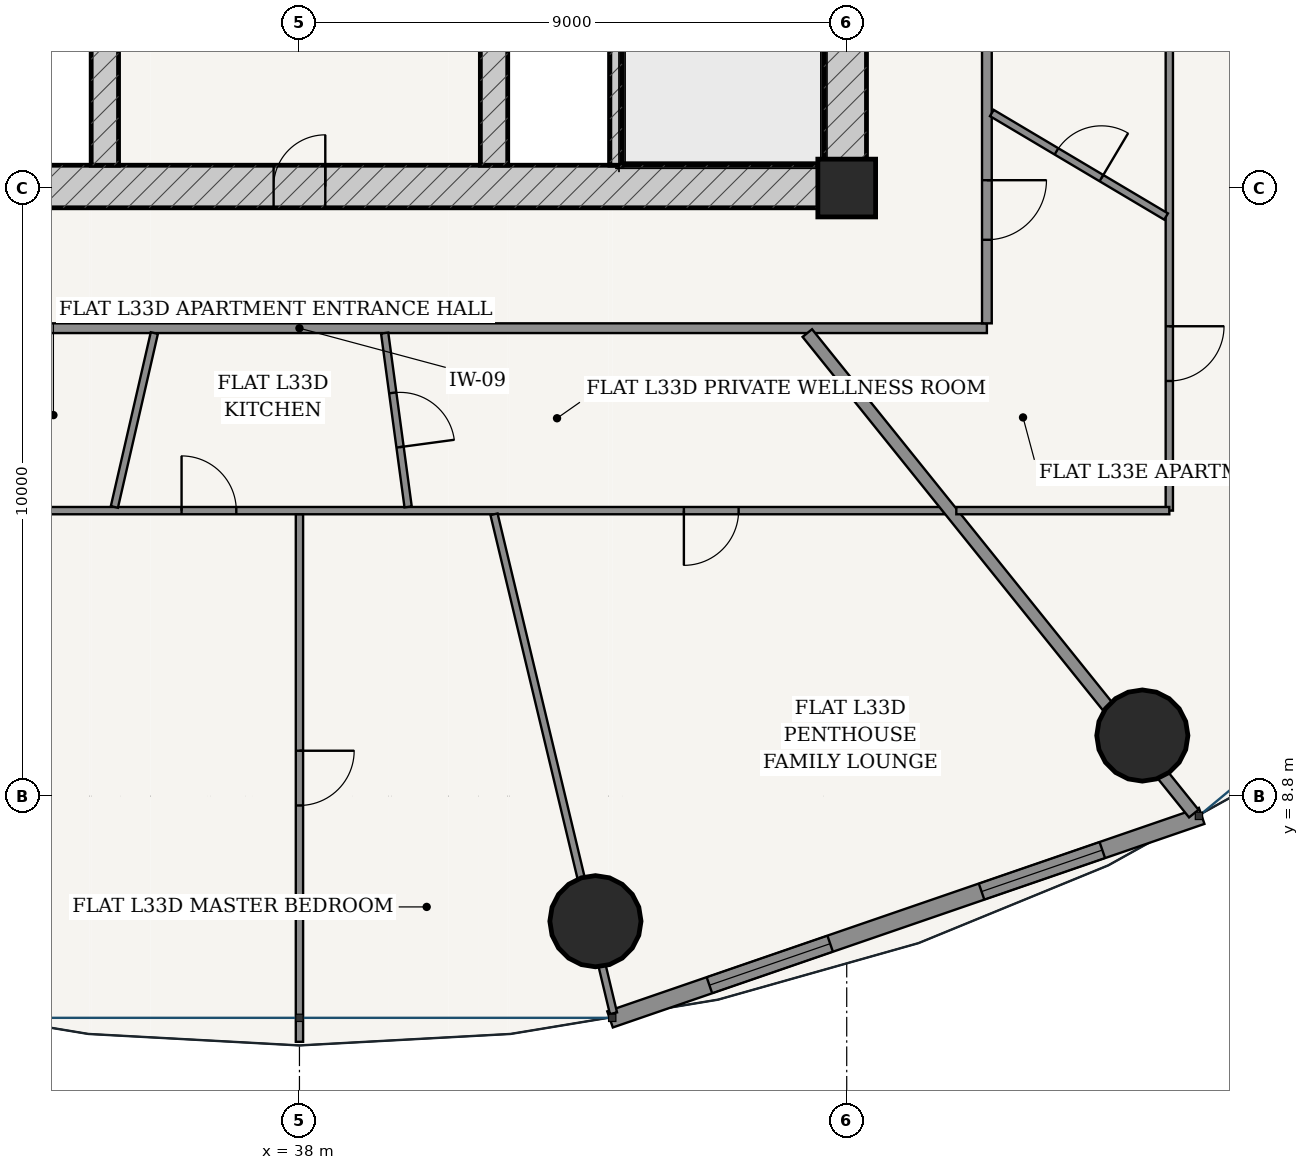
"""IFC4 building model, lengths in metres.
Left out: names, types, materials, properties, quantities, classifications, styles, units other than length and angle.
Written with IfcOpenShell. Run it as: python <this file> out.ifc"""

import sys

from ifc_helpers import new_model, si_unit, direction, frame, frame_2d, origin, origin_2d, place, context, subcontext, project, spatial, rectangle, hollow_circle, extrude, source, transform, mapped, element, fill, save


model = new_model("IFC4")
c1 = context("Model", 3, precision=1e-05, world=origin(), true_north=direction((-0.2419218956, 0.970295726276)))
c2 = subcontext(c1, "Body", "Model", "MODEL_VIEW")
j1 = project(units=[si_unit("LENGTHUNIT", "METRE"), si_unit("PLANEANGLEUNIT", "RADIAN")], contexts=[c1])
p1 = place(None, origin())
s1 = spatial("IfcSite", under=j1, at=p1, CompositionType="ELEMENT")
p2 = place(p1, origin())
s2 = spatial("IfcBuilding", under=s1, at=p2, CompositionType="ELEMENT")
p3 = place(p2, frame((0.0, 0.0, 126.6)))
s3 = spatial("IfcBuildingStorey", under=s2, at=p3, CompositionType="ELEMENT", Elevation=126.6)
p4 = place(p3, frame((47.0, 18.8, 0.0), z_axis=(0.0, 0.0, 1.0), x_axis=(1.0, 0.0, 0.0)))
e1 = element("IfcColumn", 1, at=p4, inside=s3, PredefinedType="COLUMN", context=c2, shape_type="SweptSolid", body=[
    extrude(rectangle(XDim=0.95, YDim=0.95, at=origin_2d()), origin(), (0.0, 0.0, 1.0), 3.6),
])
p5 = place(p3, frame((28.675, 18.825, 0.0), z_axis=(0.0, 0.0, 1.0), x_axis=(1.0, 0.0, 0.0)))
e2 = element("IfcWall", 2, at=p5, inside=s3, PredefinedType="SHEAR", context=c2, shape_type="SweptSolid", body=[
    extrude(rectangle(XDim=18.65, YDim=0.7, at=frame_2d((9.325, 0.0))), origin(), (0.0, 0.0, 1.0), 3.15),
])
p6 = place(p5, frame((8.9, 0.0, 0.0)))
e3 = element("IfcOpeningElement", 3, at=p6, cuts=e2, PredefinedType="OPENING", context=c2, shape_type="SweptSolid", body=[
    extrude(rectangle(XDim=0.85, YDim=2.1, at=frame_2d((0.425, 1.05))), frame((0.0, 0.36, 0.0), z_axis=(0.0, -1.0, 0.0), x_axis=(1.0, 0.0, 0.0)), (0.0, 0.0, 1.0), 0.72),
])
p7 = place(p3, frame((46.975, 19.175, 0.0), z_axis=(0.0, 0.0, 1.0), x_axis=(0.0, 1.0, 0.0)))
e4 = element("IfcWall", 4, at=p7, inside=s3, PredefinedType="SHEAR", context=c2, shape_type="SweptSolid", body=[
    extrude(rectangle(XDim=15.25, YDim=0.7, at=frame_2d((7.625, 0.0))), origin(), (0.0, 0.0, 1.0), 3.15),
])
p8 = place(p7, frame((9.875, 0.0, 0.0)))
e5 = element("IfcOpeningElement", 5, at=p8, cuts=e4, PredefinedType="OPENING", context=c2, shape_type="SweptSolid", body=[
    extrude(rectangle(XDim=1.5, YDim=2.2, at=frame_2d((0.75, 1.1))), frame((0.0, 0.36, 0.0), z_axis=(0.0, -1.0, 0.0), x_axis=(1.0, 0.0, 0.0)), (0.0, 0.0, 1.0), 0.72),
])
p9 = place(p3, frame((43.205, 19.175, 0.0), z_axis=(0.0, 0.0, 1.0), x_axis=(0.0, 1.0, 0.0)))
e6 = element("IfcWall", 6, at=p9, inside=s3, PredefinedType="SOLIDWALL", context=c2, shape_type="SweptSolid", body=[
    extrude(rectangle(XDim=7.375, YDim=0.2, at=frame_2d((3.688, 0.0))), origin(), (0.0, 0.0, 1.0), 3.15),
])
p10 = place(p3, frame((34.8, 19.175, 0.0), z_axis=(0.0, 0.0, 1.0), x_axis=(0.0, 1.0, 0.0)))
e7 = element("IfcWall", 7, at=p10, inside=s3, PredefinedType="SHEAR", context=c2, shape_type="SweptSolid", body=[
    extrude(rectangle(XDim=15.25, YDim=0.45, at=frame_2d((7.625, 0.0))), origin(), (0.0, 0.0, 1.0), 3.15),
])
p11 = place(p10, frame((7.8, 0.0, 0.0)))
e8 = element("IfcOpeningElement", 8, at=p11, cuts=e7, PredefinedType="OPENING", context=c2, shape_type="SweptSolid", body=[
    extrude(rectangle(XDim=1.05, YDim=2.15, at=frame_2d((0.525, 1.075))), frame((0.0, 0.235, 0.0), z_axis=(0.0, -1.0, 0.0), x_axis=(1.0, 0.0, 0.0)), (0.0, 0.0, 1.0), 0.47),
])
p12 = place(p3, frame((41.2, 19.175, 0.0), z_axis=(0.0, 0.0, 1.0), x_axis=(0.0, 1.0, 0.0)))
e9 = element("IfcWall", 9, at=p12, inside=s3, PredefinedType="SHEAR", context=c2, shape_type="SweptSolid", body=[
    extrude(rectangle(XDim=15.25, YDim=0.45, at=frame_2d((7.625, 0.0))), origin(), (0.0, 0.0, 1.0), 3.15),
])
p13 = place(p12, frame((7.8, 0.0, 0.0)))
e10 = element("IfcOpeningElement", 10, at=p13, cuts=e9, PredefinedType="OPENING", context=c2, shape_type="SweptSolid", body=[
    extrude(rectangle(XDim=1.05, YDim=2.15, at=frame_2d((0.525, 1.075))), frame((0.0, 0.235, 0.0), z_axis=(0.0, -1.0, 0.0), x_axis=(1.0, 0.0, 0.0)), (0.0, 0.0, 1.0), 0.47),
])
for number, where, z_axis, x_axis in (
    (11, (42.867, 6.743, 0.0), (0.0, 0.0, 1.0), (1.0, 0.0, 0.0)),
    (12, (51.862, 9.796, 0.0), (0.0, 0.0, 1.0), (1.0, 0.0, 0.0)),
):
    element("IfcColumn", number, at=place(p3, frame(where, z_axis=z_axis, x_axis=x_axis)), inside=s3, PredefinedType="COLUMN", context=c2, shape_type="SweptSolid", body=[
        extrude(hollow_circle(Radius=0.75, WallThickness=0.045, at=origin_2d()), origin(), (0.0, 0.0, 1.0), 3.6),
    ])
p14 = place(p3, frame((43.108, 5.128, 0.0), z_axis=(0.0, 0.0, 1.0), x_axis=(0.945590132341, 0.325360264351, 0.0)))
e13 = element("IfcWall", 13, at=p14, inside=s3, PredefinedType="SOLIDWALL", context=c2, shape_type="SweptSolid", body=[
    extrude(rectangle(XDim=10.289, YDim=0.28, at=frame_2d((5.145, 0.0))), origin(), (0.0, 0.0, 1.0), 3.15),
])
p15 = place(p14, frame((1.728, 0.0, 0.85)))
e14 = element("IfcOpeningElement", 14, at=p15, cuts=e13, PredefinedType="OPENING", context=c2, shape_type="SweptSolid", body=[
    extrude(rectangle(XDim=2.1, YDim=1.95, at=frame_2d((1.05, 0.975))), frame((0.0, 0.15, 0.0), z_axis=(0.0, -1.0, 0.0), x_axis=(1.0, 0.0, 0.0)), (0.0, 0.0, 1.0), 0.3),
])
p16 = place(p14, frame((6.461, 0.0, 0.85)))
e15 = element("IfcOpeningElement", 15, at=p16, cuts=e13, PredefinedType="OPENING", context=c2, shape_type="SweptSolid", body=[
    extrude(rectangle(XDim=2.1, YDim=1.95, at=frame_2d((1.05, 0.975))), frame((0.0, 0.15, 0.0), z_axis=(0.0, -1.0, 0.0), x_axis=(1.0, 0.0, 0.0)), (0.0, 0.0, 1.0), 0.3),
])
p17 = place(p3, frame((26.695, 16.495, 0.0), z_axis=(0.0, 0.0, 1.0), x_axis=(1.0, 0.0, 0.0)))
e16 = element("IfcWall", 16, at=p17, inside=s3, PredefinedType="PARTITIONING", context=c2, shape_type="SweptSolid", body=[
    extrude(rectangle(XDim=22.61, YDim=0.16, at=frame_2d((11.305, 0.0))), origin(), (0.0, 0.0, 1.0), 2.596),
])
p18 = place(p17, frame((4.883, 0.0, 0.0)))
e17 = element("IfcOpeningElement", 17, at=p18, cuts=e16, PredefinedType="OPENING", context=c2, shape_type="SweptSolid", body=[
    extrude(rectangle(XDim=0.98, YDim=2.2, at=frame_2d((0.49, 1.1))), frame((0.0, 0.09, 0.0), z_axis=(0.0, -1.0, 0.0), x_axis=(1.0, 0.0, 0.0)), (0.0, 0.0, 1.0), 0.18),
])
p19 = place(p3, frame((49.305, 16.575, 0.0), z_axis=(0.0, 0.0, 1.0), x_axis=(0.0, 1.0, 0.0)))
e18 = element("IfcWall", 18, at=p19, inside=s3, PredefinedType="PARTITIONING", context=c2, shape_type="SweptSolid", body=[
    extrude(rectangle(XDim=20.45, YDim=0.16, at=frame_2d((10.225, 0.0))), origin(), (0.0, 0.0, 1.0), 2.596),
])
p20 = place(p19, frame((17.66, 0.0, 0.0)))
e19 = element("IfcOpeningElement", 19, at=p20, cuts=e18, PredefinedType="OPENING", context=c2, shape_type="SweptSolid", body=[
    extrude(rectangle(XDim=0.98, YDim=2.2, at=frame_2d((0.49, 1.1))), frame((0.0, 0.09, 0.0), z_axis=(0.0, -1.0, 0.0), x_axis=(1.0, 0.0, 0.0)), (0.0, 0.0, 1.0), 0.18),
])
p21 = place(p19, frame((1.374, 0.0, 0.0)))
e20 = element("IfcOpeningElement", 20, at=p21, cuts=e18, PredefinedType="OPENING", context=c2, shape_type="SweptSolid", body=[
    extrude(rectangle(XDim=0.98, YDim=2.2, at=frame_2d((0.49, 1.1))), frame((0.0, 0.09, 0.0), z_axis=(0.0, -1.0, 0.0), x_axis=(1.0, 0.0, 0.0)), (0.0, 0.0, 1.0), 0.18),
])
p22 = place(p3, frame((48.598, 13.495, 0.0), z_axis=(0.0, 0.0, 1.0), x_axis=(-1.0, 0.0, 0.0)))
e21 = element("IfcWall", 21, at=p22, inside=s3, PredefinedType="PARTITIONING", context=c2, shape_type="SweptSolid", body=[
    extrude(rectangle(XDim=24.903, YDim=0.12, at=frame_2d((12.452, 0.0))), origin(), (0.0, 0.0, 1.0), 2.596),
])
p23 = place(p22, frame((17.72, 0.0, 0.0)))
e22 = element("IfcOpeningElement", 22, at=p23, cuts=e21, PredefinedType="OPENING", context=c2, shape_type="SweptSolid", body=[
    extrude(rectangle(XDim=0.9, YDim=2.15, at=frame_2d((0.45, 1.075))), frame((0.0, 0.07, 0.0), z_axis=(0.0, -1.0, 0.0), x_axis=(1.0, 0.0, 0.0)), (0.0, 0.0, 1.0), 0.14),
])
p24 = place(p22, frame((11.637, 0.0, 0.0)))
e23 = element("IfcOpeningElement", 23, at=p24, cuts=e21, PredefinedType="OPENING", context=c2, shape_type="SweptSolid", body=[
    extrude(rectangle(XDim=0.9, YDim=2.15, at=frame_2d((0.45, 1.075))), frame((0.0, 0.07, 0.0), z_axis=(0.0, -1.0, 0.0), x_axis=(1.0, 0.0, 0.0)), (0.0, 0.0, 1.0), 0.14),
])
p25 = place(p22, frame((3.376, 0.0, 0.0)))
e24 = element("IfcOpeningElement", 24, at=p25, cuts=e21, PredefinedType="OPENING", context=c2, shape_type="SweptSolid", body=[
    extrude(rectangle(XDim=0.9, YDim=2.15, at=frame_2d((0.45, 1.075))), frame((0.0, 0.07, 0.0), z_axis=(0.0, -1.0, 0.0), x_axis=(1.0, 0.0, 0.0)), (0.0, 0.0, 1.0), 0.14),
])
p26 = place(p3, frame((38.0, 13.433, 0.0), z_axis=(0.0, 0.0, 1.0), x_axis=(0.0, -1.0, 0.0)))
e25 = element("IfcWall", 25, at=p26, inside=s3, PredefinedType="PARTITIONING", context=c2, shape_type="SweptSolid", body=[
    extrude(rectangle(XDim=8.673, YDim=0.12, at=frame_2d((4.336, 0.0))), origin(), (0.0, 0.0, 1.0), 2.666),
])
p27 = place(p26, frame((3.886, 0.0, 0.0)))
e26 = element("IfcOpeningElement", 26, at=p27, cuts=e25, PredefinedType="OPENING", context=c2, shape_type="SweptSolid", body=[
    extrude(rectangle(XDim=0.9, YDim=2.15, at=frame_2d((0.45, 1.075))), frame((0.0, 0.07, 0.0), z_axis=(0.0, -1.0, 0.0), x_axis=(1.0, 0.0, 0.0)), (0.0, 0.0, 1.0), 0.14),
])
p28 = place(p3, frame((41.2, 13.435, 0.0), z_axis=(0.0, 0.0, 1.0), x_axis=(0.232814779051, -0.972521094196, 0.0)))
e27 = element("IfcWall", 27, at=p28, inside=s3, PredefinedType="PARTITIONING", context=c2, shape_type="SweptSolid", body=[
    extrude(rectangle(XDim=8.438, YDim=0.12, at=frame_2d((4.219, 0.0))), origin(), (0.0, 0.0, 1.0), 2.5),
])
p29 = place(p3, frame((35.614, 16.415, 0.0), z_axis=(0.0, 0.0, 1.0), x_axis=(-0.223911395669, -0.974609504822, 0.0)))
e28 = element("IfcWall", 28, at=p29, inside=s3, PredefinedType="PARTITIONING", context=c2, shape_type="SweptSolid", body=[
    extrude(rectangle(XDim=2.934, YDim=0.12, at=frame_2d((1.467, 0.0))), origin(), (0.0, 0.0, 1.0), 2.596),
])
p30 = place(p3, frame((39.401, 16.415, 0.0), z_axis=(0.0, 0.0, 1.0), x_axis=(0.133726943496, -0.99101821607, 0.0)))
e29 = element("IfcWall", 29, at=p30, inside=s3, PredefinedType="PARTITIONING", context=c2, shape_type="SweptSolid", body=[
    extrude(rectangle(XDim=2.885, YDim=0.12, at=frame_2d((1.442, 0.0))), origin(), (0.0, 0.0, 1.0), 3.15),
])
p31 = place(p30, frame((0.992, 0.0, 0.0)))
e30 = element("IfcOpeningElement", 30, at=p31, cuts=e29, PredefinedType="OPENING", context=c2, shape_type="SweptSolid", body=[
    extrude(rectangle(XDim=0.9, YDim=2.15, at=frame_2d((0.45, 1.075))), frame((0.0, 0.07, 0.0), z_axis=(0.0, -1.0, 0.0), x_axis=(1.0, 0.0, 0.0)), (0.0, 0.0, 1.0), 0.14),
])
p32 = place(p3, frame((46.352, 16.415, 0.0), z_axis=(0.0, 0.0, 1.0), x_axis=(0.626701127389, -0.779259710834, 0.0)))
e31 = element("IfcWall", 31, at=p32, inside=s3, PredefinedType="PARTITIONING", context=c2, shape_type="SweptSolid", body=[
    extrude(rectangle(XDim=10.141, YDim=0.2, at=frame_2d((5.071, 0.0))), origin(), (0.0, 0.0, 1.0), 2.5),
])
p33 = place(p3, frame((52.305, 29.062, 0.0), z_axis=(0.0, 0.0, 1.0), x_axis=(0.0, -1.0, 0.0)))
e32 = element("IfcWall", 32, at=p33, inside=s3, PredefinedType="PARTITIONING", context=c2, shape_type="SweptSolid", body=[
    extrude(rectangle(XDim=15.567, YDim=0.12, at=frame_2d((7.783, 0.0))), origin(), (0.0, 0.0, 1.0), 2.596),
])
p34 = place(p33, frame((12.535, 0.0, 0.0)))
e33 = element("IfcOpeningElement", 33, at=p34, cuts=e32, PredefinedType="OPENING", context=c2, shape_type="SweptSolid", body=[
    extrude(rectangle(XDim=0.9, YDim=2.15, at=frame_2d((0.45, 1.075))), frame((0.0, 0.07, 0.0), z_axis=(0.0, -1.0, 0.0), x_axis=(1.0, 0.0, 0.0)), (0.0, 0.0, 1.0), 0.14),
])
p35 = place(p33, frame((2.582, 0.0, 0.0)))
e34 = element("IfcOpeningElement", 34, at=p35, cuts=e32, PredefinedType="OPENING", context=c2, shape_type="SweptSolid", body=[
    extrude(rectangle(XDim=0.9, YDim=2.15, at=frame_2d((0.45, 1.075))), frame((0.0, 0.07, 0.0), z_axis=(0.0, -1.0, 0.0), x_axis=(1.0, 0.0, 0.0)), (0.0, 0.0, 1.0), 0.14),
])
p36 = place(p3, frame((52.305, 13.495, 0.0), z_axis=(0.0, 0.0, 1.0), x_axis=(-1.0, 0.0, 0.0)))
e35 = element("IfcWall", 35, at=p36, inside=s3, PredefinedType="PARTITIONING", context=c2, shape_type="SweptSolid", body=[
    extrude(rectangle(XDim=3.503, YDim=0.12, at=frame_2d((1.751, 0.0))), origin(), (0.0, 0.0, 1.0), 2.596),
])
p37 = place(p3, frame((49.387, 20.034, 0.0), z_axis=(0.0, 0.0, 1.0), x_axis=(0.859682842925, -0.510828160521, 0.0)))
e36 = element("IfcWall", 36, at=p37, inside=s3, PredefinedType="PARTITIONING", context=c2, shape_type="SweptSolid", body=[
    extrude(rectangle(XDim=3.333, YDim=0.12, at=frame_2d((1.666, 0.0))), origin(), (0.0, 0.0, 1.0), 2.825),
])
p38 = place(p37, frame((1.236, 0.0, 0.0)))
e37 = element("IfcOpeningElement", 37, at=p38, cuts=e36, PredefinedType="OPENING", context=c2, shape_type="SweptSolid", body=[
    extrude(rectangle(XDim=0.86, YDim=2.15, at=frame_2d((0.43, 1.075))), frame((0.0, 0.07, 0.0), z_axis=(0.0, -1.0, 0.0), x_axis=(1.0, 0.0, 0.0)), (0.0, 0.0, 1.0), 0.14),
])
m1 = source(origin(), c2, "Body", "SweptSolid", [
    extrude(rectangle(XDim=2.1, YDim=1.95, at=frame_2d((1.05, 0.975))), frame((0.0, 0.03, 0.0), z_axis=(0.0, -1.0, 0.0), x_axis=(1.0, 0.0, 0.0)), (0.0, 0.0, 1.0), 0.06),
])
p39 = place(p15, origin())
e38 = element("IfcWindow", 38, at=p39, inside=s3, PartitioningType="SINGLE_PANEL", PredefinedType="WINDOW", context=c2, shape_type="MappedRepresentation", body=[
    mapped(m1, transform((0.0, 0.0, 0.0), scale=1.0)),
])
fill(e14, e38)
p40 = place(p16, origin())
e39 = element("IfcWindow", 39, at=p40, inside=s3, PartitioningType="SINGLE_PANEL", PredefinedType="WINDOW", context=c2, shape_type="MappedRepresentation", body=[
    mapped(m1, transform((0.0, 0.0, 0.0), scale=1.0)),
])
fill(e15, e39)
m2 = source(origin(), c2, "Body", "SweptSolid", [
    extrude(rectangle(XDim=0.85, YDim=2.1, at=frame_2d((0.425, 1.05))), frame((0.0, 0.025, 0.0), z_axis=(0.0, -1.0, 0.0), x_axis=(1.0, 0.0, 0.0)), (0.0, 0.0, 1.0), 0.05),
])
p41 = place(p6, origin())
e40 = element("IfcDoor", 40, at=p41, inside=s3, OperationType="SINGLE_SWING_RIGHT", PredefinedType="DOOR", context=c2, shape_type="MappedRepresentation", body=[
    mapped(m2, transform((0.0, 0.0, 0.0), scale=1.0)),
])
fill(e3, e40)
m3 = source(origin(), c2, "Body", "SweptSolid", [
    extrude(rectangle(XDim=0.9, YDim=2.15, at=frame_2d((0.45, 1.075))), frame((0.0, 0.025, 0.0), z_axis=(0.0, -1.0, 0.0), x_axis=(1.0, 0.0, 0.0)), (0.0, 0.0, 1.0), 0.05),
])
p42 = place(p24, frame((0.9, 0.0, 0.0), z_axis=(0.0, 0.0, 1.0), x_axis=(-1.0, 0.0, 0.0)))
e41 = element("IfcDoor", 41, at=p42, inside=s3, OperationType="SINGLE_SWING_LEFT", PredefinedType="DOOR", context=c2, shape_type="MappedRepresentation", body=[
    mapped(m3, transform((0.0, 0.0, 0.0), scale=1.0)),
])
fill(e23, e41)
p43 = place(p31, origin())
e42 = element("IfcDoor", 42, at=p43, inside=s3, OperationType="SINGLE_SWING_RIGHT", PredefinedType="DOOR", context=c2, shape_type="MappedRepresentation", body=[
    mapped(m3, transform((0.0, 0.0, 0.0), scale=1.0)),
])
fill(e30, e42)
p44 = place(p27, origin())
e43 = element("IfcDoor", 43, at=p44, inside=s3, OperationType="SINGLE_SWING_LEFT", PredefinedType="DOOR", context=c2, shape_type="MappedRepresentation", body=[
    mapped(m3, transform((0.0, 0.0, 0.0), scale=1.0)),
])
fill(e26, e43)
p45 = place(p25, origin())
e44 = element("IfcDoor", 44, at=p45, inside=s3, OperationType="SINGLE_SWING_RIGHT", PredefinedType="DOOR", context=c2, shape_type="MappedRepresentation", body=[
    mapped(m3, transform((0.0, 0.0, 0.0), scale=1.0)),
])
fill(e24, e44)
m4 = source(origin(), c2, "Body", "SweptSolid", [
    extrude(rectangle(XDim=0.98, YDim=2.2, at=frame_2d((0.49, 1.1))), frame((0.0, 0.025, 0.0), z_axis=(0.0, -1.0, 0.0), x_axis=(1.0, 0.0, 0.0)), (0.0, 0.0, 1.0), 0.05),
])
p46 = place(p21, frame((0.98, 0.0, 0.0), z_axis=(0.0, 0.0, 1.0), x_axis=(-1.0, 0.0, 0.0)))
e45 = element("IfcDoor", 45, at=p46, inside=s3, OperationType="SINGLE_SWING_LEFT", PredefinedType="DOOR", context=c2, shape_type="MappedRepresentation", body=[
    mapped(m4, transform((0.0, 0.0, 0.0), scale=1.0)),
])
fill(e20, e45)
m5 = source(origin(), c2, "Body", "SweptSolid", [
    extrude(rectangle(XDim=0.86, YDim=2.15, at=frame_2d((0.43, 1.075))), frame((0.0, 0.025, 0.0), z_axis=(0.0, -1.0, 0.0), x_axis=(1.0, 0.0, 0.0)), (0.0, 0.0, 1.0), 0.05),
])
p47 = place(p38, origin())
e46 = element("IfcDoor", 46, at=p47, inside=s3, OperationType="SINGLE_SWING_RIGHT", PredefinedType="DOOR", context=c2, shape_type="MappedRepresentation", body=[
    mapped(m5, transform((0.0, 0.0, 0.0), scale=1.0)),
])
fill(e37, e46)
p48 = place(p34, origin())
e47 = element("IfcDoor", 47, at=p48, inside=s3, OperationType="SINGLE_SWING_LEFT", PredefinedType="DOOR", context=c2, shape_type="MappedRepresentation", body=[
    mapped(m3, transform((0.0, 0.0, 0.0), scale=1.0)),
])
fill(e33, e47)
save(model, sys.argv[1])
